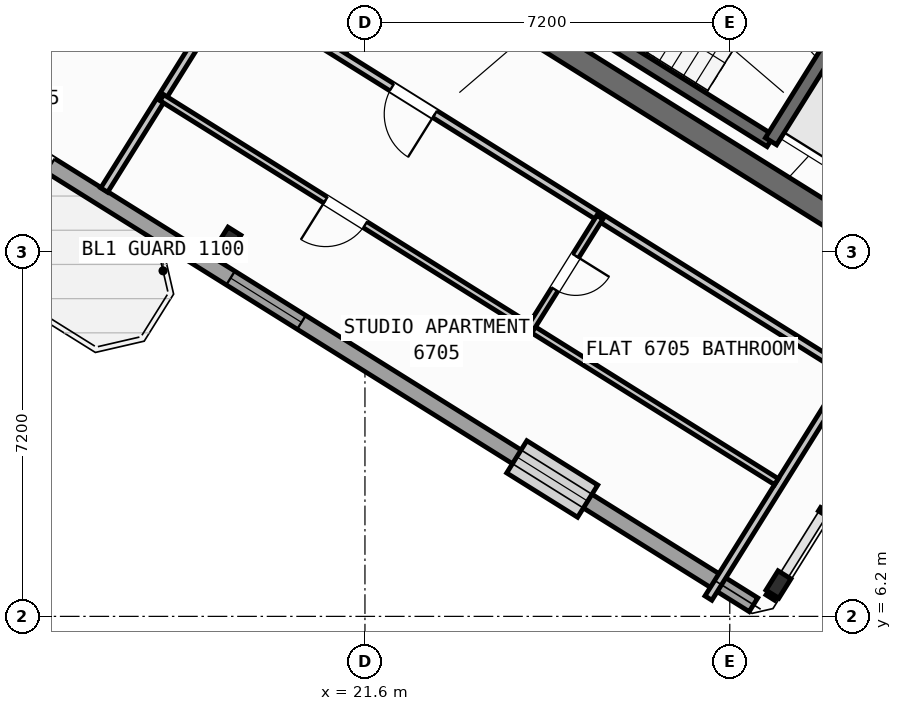
"""IFC4 building model, lengths in metres.
Left out: names, types, materials, properties, quantities, classifications, styles, units other than length and angle.
Written with IfcOpenShell. Run it as: python <this file> out.ifc"""

import sys

from ifc_helpers import new_model, si_unit, direction, frame, frame_2d, origin, origin_2d, place, context, subcontext, project, spatial, rectangle, i_section, extrude, source, transform, mapped, element, fill, save


model = new_model("IFC4")
c1 = context("Model", 3, precision=1e-05, world=origin(), true_north=direction((0.0, 1.0)))
c2 = subcontext(c1, "Body", "Model", "MODEL_VIEW")
j1 = project(units=[si_unit("LENGTHUNIT", "METRE"), si_unit("PLANEANGLEUNIT", "RADIAN")], contexts=[c1])
p1 = place(None, origin())
s1 = spatial("IfcSite", under=j1, at=p1, CompositionType="ELEMENT")
p2 = place(p1, origin())
s2 = spatial("IfcBuilding", under=s1, at=p2, CompositionType="ELEMENT")
p3 = place(p2, frame((0.0, 0.0, 266.4)))
s3 = spatial("IfcBuildingStorey", under=s2, at=p3, CompositionType="ELEMENT", Elevation=266.4)
p4 = place(p3, frame((33.324, 12.503, 0.0), z_axis=(0.0, 0.0, 1.0), x_axis=(-0.848043529849, 0.529926571782, 0.0)))
e1 = element("IfcWall", 1, at=p4, inside=s3, PredefinedType="SHEAR", context=c2, shape_type="SweptSolid", body=[
    extrude(rectangle(XDim=13.04, YDim=0.45, at=frame_2d((6.52, 0.0))), origin(), (0.0, 0.0, 1.0), 3.35),
])
m1 = source(origin(), c2, "Body", "SweptSolid", [
    extrude(i_section(OverallWidth=0.3, OverallDepth=0.45, WebThickness=0.014, FlangeThickness=0.026, at=origin_2d()), origin(), (0.0, 0.0, 1.0), 3.6),
])
for number, where, z_axis, x_axis in (
    (2, (29.761, 6.829, 0.0), (0.0, 0.0, 1.0), (-0.848, 0.53, 0.0)),
    (3, (18.906, 13.612, 0.0), (0.0, 0.0, 1.0), (-0.848, 0.53, 0.0)),
):
    element("IfcColumn", number, at=place(p3, frame(where, z_axis=z_axis, x_axis=x_axis)), inside=s3, PredefinedType="COLUMN", context=c2, shape_type="MappedRepresentation", body=[
        mapped(m1, transform((0.0, 0.0, 0.0), scale=1.0)),
    ])
p5 = place(p3, frame((29.268, 6.429, 0.0), z_axis=(0.0, 0.0, 1.0), x_axis=(-0.848049971435, 0.529916263149, 0.0)))
e4 = element("IfcWall", 4, at=p5, inside=s3, PredefinedType="STANDARD", context=c2, shape_type="SweptSolid", body=[
    extrude(rectangle(XDim=31.588, YDim=0.32, at=frame_2d((15.794, 0.0))), origin(), (0.0, 0.0, 1.0), 3.35),
])
p6 = place(p5, frame((16.362, 0.0, 0.0)))
e5 = element("IfcOpeningElement", 5, at=p6, cuts=e4, PredefinedType="OPENING", context=c2, shape_type="SweptSolid", body=[
    extrude(rectangle(XDim=1.2, YDim=2.15, at=frame_2d((0.6, 1.075))), frame((0.0, 0.17, 0.0), z_axis=(0.0, -1.0, 0.0), x_axis=(1.0, 0.0, 0.0)), (0.0, 0.0, 1.0), 0.34),
])
p7 = place(p5, frame((3.859, 0.0, 0.9)))
e6 = element("IfcOpeningElement", 6, at=p7, cuts=e4, PredefinedType="OPENING", context=c2, shape_type="SweptSolid", body=[
    extrude(rectangle(XDim=1.65, YDim=1.45, at=frame_2d((0.825, 0.725))), frame((0.0, 0.17, 0.0), z_axis=(0.0, -1.0, 0.0), x_axis=(1.0, 0.0, 0.0)), (0.0, 0.0, 1.0), 0.34),
])
p8 = place(p5, frame((10.519, 0.0, 0.9)))
e7 = element("IfcOpeningElement", 7, at=p8, cuts=e4, PredefinedType="OPENING", context=c2, shape_type="SweptSolid", body=[
    extrude(rectangle(XDim=1.65, YDim=1.45, at=frame_2d((0.825, 0.725))), frame((0.0, 0.17, 0.0), z_axis=(0.0, -1.0, 0.0), x_axis=(1.0, 0.0, 0.0)), (0.0, 0.0, 1.0), 0.34),
])
p9 = place(p5, frame((21.219, 0.0, 0.95)))
e8 = element("IfcOpeningElement", 8, at=p9, cuts=e4, PredefinedType="OPENING", context=c2, shape_type="SweptSolid", body=[
    extrude(rectangle(XDim=1.95, YDim=1.35, at=frame_2d((0.975, 0.675))), frame((0.0, 0.17, 0.0), z_axis=(0.0, -1.0, 0.0), x_axis=(1.0, 0.0, 0.0)), (0.0, 0.0, 1.0), 0.34),
])
p10 = place(p5, frame((26.406, 0.0, 1.0)))
e9 = element("IfcOpeningElement", 9, at=p10, cuts=e4, PredefinedType="OPENING", context=c2, shape_type="SweptSolid", body=[
    extrude(rectangle(XDim=0.9, YDim=1.25, at=frame_2d((0.45, 0.625))), frame((0.0, 0.17, 0.0), z_axis=(0.0, -1.0, 0.0), x_axis=(1.0, 0.0, 0.0)), (0.0, 0.0, 1.0), 0.34),
])
p11 = place(p5, frame((29.143, 0.0, 0.9)))
e10 = element("IfcOpeningElement", 10, at=p11, cuts=e4, PredefinedType="OPENING", context=c2, shape_type="SweptSolid", body=[
    extrude(rectangle(XDim=1.65, YDim=1.45, at=frame_2d((0.825, 0.725))), frame((0.0, 0.17, 0.0), z_axis=(0.0, -1.0, 0.0), x_axis=(1.0, 0.0, 0.0)), (0.0, 0.0, 1.0), 0.34),
])
p12 = place(p3, frame((29.605, 15.581, 0.0), z_axis=(0.0, 0.0, 1.0), x_axis=(-0.848036911448, 0.529937163087, 0.0)))
e11 = element("IfcWall", 11, at=p12, inside=s3, PredefinedType="SHEAR", context=c2, shape_type="SweptSolid", body=[
    extrude(rectangle(XDim=7.46, YDim=0.26, at=frame_2d((3.73, 0.0))), origin(), (0.0, 0.0, 1.0), 3.35),
])
p13 = place(p3, frame((31.288, 18.256, 0.0), z_axis=(0.0, 0.0, 1.0), x_axis=(-0.529943379326, -0.848033026897, 0.0)))
e12 = element("IfcWall", 12, at=p13, inside=s3, PredefinedType="SHEAR", context=c2, shape_type="SweptSolid", body=[
    extrude(rectangle(XDim=3.16, YDim=0.26, at=frame_2d((1.58, 0.0))), origin(), (0.0, 0.0, 1.0), 3.35),
])
p14 = place(p3, frame((21.206, 17.292, 0.0), z_axis=(0.0, 0.0, 1.0), x_axis=(-0.848050851465, 0.529914854792, 0.0)))
e13 = element("IfcWall", 13, at=p14, inside=s3, PredefinedType="PARTITIONING", context=c2, shape_type="SweptSolid", body=[
    extrude(rectangle(XDim=2.61, YDim=0.16, at=frame_2d((1.305, 0.0))), origin(), (0.0, 0.0, 1.0), 3.34),
])
p15 = place(p3, frame((21.329, 22.416, 0.0), z_axis=(0.0, 0.0, 1.0), x_axis=(-0.529920220799, -0.848047498427, 0.0)))
e14 = element("IfcWall", 14, at=p15, inside=s3, PredefinedType="PARTITIONING", context=c2, shape_type="SweptSolid", body=[
    extrude(rectangle(XDim=9.2, YDim=0.16, at=frame_2d((4.6, 0.0))), origin(), (0.0, 0.0, 1.0), 3.34),
])
p16 = place(p3, frame((16.572, 21.954, 0.0), z_axis=(0.0, 0.0, 1.0), x_axis=(-0.529904903214, -0.848057069748, 0.0)))
e15 = element("IfcWall", 15, at=p16, inside=s3, PredefinedType="PARTITIONING", context=c2, shape_type="SweptSolid", body=[
    extrude(rectangle(XDim=5.601, YDim=0.16, at=frame_2d((2.801, 0.0))), origin(), (0.0, 0.0, 1.0), 2.875),
])
p17 = place(p3, frame((32.164, 10.374, 0.0), z_axis=(0.0, 0.0, 1.0), x_axis=(-0.848044107957, 0.529925646633, 0.0)))
e16 = element("IfcWall", 16, at=p17, inside=s3, PredefinedType="PARTITIONING", context=c2, shape_type="SweptSolid", body=[
    extrude(rectangle(XDim=15.57, YDim=0.16, at=frame_2d((7.785, 0.0))), origin(), (0.0, 0.0, 1.0), 3.34),
])
p18 = place(p17, frame((10.83, 0.0, 0.0)))
e17 = element("IfcOpeningElement", 17, at=p18, cuts=e16, PredefinedType="OPENING", context=c2, shape_type="SweptSolid", body=[
    extrude(rectangle(XDim=1.0, YDim=2.1, at=frame_2d((0.5, 1.05))), frame((0.0, 0.09, 0.0), z_axis=(0.0, -1.0, 0.0), x_axis=(1.0, 0.0, 0.0)), (0.0, 0.0, 1.0), 0.18),
])
p19 = place(p3, frame((31.282, 11.208, 0.0), z_axis=(0.0, 0.0, 1.0), x_axis=(-0.529938869374, -0.84803584519, 0.0)))
e18 = element("IfcWall", 18, at=p19, inside=s3, PredefinedType="PARTITIONING", context=c2, shape_type="SweptSolid", body=[
    extrude(rectangle(XDim=5.48, YDim=0.16, at=frame_2d((2.74, 0.0))), origin(), (0.0, 0.0, 1.0), 3.34),
])
p20 = place(p3, frame((29.72, 8.859, 0.0), z_axis=(0.0, 0.0, 1.0), x_axis=(-0.848049134363, 0.529917602752, 0.0)))
e19 = element("IfcWall", 19, at=p20, inside=s3, PredefinedType="PLUMBINGWALL", context=c2, shape_type="SweptSolid", body=[
    extrude(rectangle(XDim=14.3, YDim=0.14, at=frame_2d((7.15, 0.0))), origin(), (0.0, 0.0, 1.0), 3.34),
])
p21 = place(p20, frame((9.57, 0.0, 0.0)))
e20 = element("IfcOpeningElement", 20, at=p21, cuts=e19, PredefinedType="OPENING", context=c2, shape_type="SweptSolid", body=[
    extrude(rectangle(XDim=0.92, YDim=2.08, at=frame_2d((0.46, 1.04))), frame((0.0, 0.08, 0.0), z_axis=(0.0, -1.0, 0.0), x_axis=(1.0, 0.0, 0.0)), (0.0, 0.0, 1.0), 0.16),
])
p22 = place(p3, frame((26.237, 14.078, 0.0), z_axis=(0.0, 0.0, 1.0), x_axis=(-0.52995640672, -0.848024885824, 0.0)))
e21 = element("IfcWall", 21, at=p22, inside=s3, PredefinedType="PLUMBINGWALL", context=c2, shape_type="SweptSolid", body=[
    extrude(rectangle(XDim=2.58, YDim=0.14, at=frame_2d((1.29, 0.0))), origin(), (0.0, 0.0, 1.0), 3.34),
])
p23 = place(p22, frame((0.9, 0.0, 0.0)))
e22 = element("IfcOpeningElement", 22, at=p23, cuts=e21, PredefinedType="OPENING", context=c2, shape_type="SweptSolid", body=[
    extrude(rectangle(XDim=0.78, YDim=2.05, at=frame_2d((0.39, 1.025))), frame((0.0, 0.08, 0.0), z_axis=(0.0, -1.0, 0.0), x_axis=(1.0, 0.0, 0.0)), (0.0, 0.0, 1.0), 0.16),
])
m2 = source(origin(), c2, "Body", "SweptSolid", [
    extrude(rectangle(XDim=1.65, YDim=1.45, at=frame_2d((0.825, 0.725))), frame((0.0, 0.03, 0.0), z_axis=(0.0, -1.0, 0.0), x_axis=(1.0, 0.0, 0.0)), (0.0, 0.0, 1.0), 0.06),
])
p24 = place(p7, origin())
e23 = element("IfcWindow", 23, at=p24, inside=s3, PartitioningType="SINGLE_PANEL", PredefinedType="WINDOW", context=c2, shape_type="MappedRepresentation", body=[
    mapped(m2, transform((0.0, 0.0, 0.0), scale=1.0)),
])
fill(e6, e23)
p25 = place(p8, origin())
e24 = element("IfcWindow", 24, at=p25, inside=s3, PartitioningType="SINGLE_PANEL", PredefinedType="WINDOW", context=c2, shape_type="MappedRepresentation", body=[
    mapped(m2, transform((0.0, 0.0, 0.0), scale=1.0)),
])
fill(e7, e24)
m3 = source(origin(), c2, "Body", "SweptSolid", [
    extrude(rectangle(XDim=1.0, YDim=2.1, at=frame_2d((0.5, 1.05))), frame((0.0, 0.025, 0.0), z_axis=(0.0, -1.0, 0.0), x_axis=(1.0, 0.0, 0.0)), (0.0, 0.0, 1.0), 0.05),
])
p26 = place(p18, origin())
e25 = element("IfcDoor", 25, at=p26, inside=s3, OperationType="SINGLE_SWING_LEFT", PredefinedType="DOOR", context=c2, shape_type="MappedRepresentation", body=[
    mapped(m3, transform((0.0, 0.0, 0.0), scale=1.0)),
])
fill(e17, e25)
m4 = source(origin(), c2, "Body", "SweptSolid", [
    extrude(rectangle(XDim=0.92, YDim=2.08, at=frame_2d((0.46, 1.04))), frame((0.0, 0.025, 0.0), z_axis=(0.0, -1.0, 0.0), x_axis=(1.0, 0.0, 0.0)), (0.0, 0.0, 1.0), 0.05),
])
p27 = place(p21, origin())
e26 = element("IfcDoor", 26, at=p27, inside=s3, OperationType="SINGLE_SWING_RIGHT", PredefinedType="DOOR", context=c2, shape_type="MappedRepresentation", body=[
    mapped(m4, transform((0.0, 0.0, 0.0), scale=1.0)),
])
fill(e20, e26)
m5 = source(origin(), c2, "Body", "SweptSolid", [
    extrude(rectangle(XDim=0.78, YDim=2.05, at=frame_2d((0.39, 1.025))), frame((0.0, 0.025, 0.0), z_axis=(0.0, -1.0, 0.0), x_axis=(1.0, 0.0, 0.0)), (0.0, 0.0, 1.0), 0.05),
])
p28 = place(p23, origin())
e27 = element("IfcDoor", 27, at=p28, inside=s3, OperationType="SINGLE_SWING_LEFT", PredefinedType="DOOR", context=c2, shape_type="MappedRepresentation", body=[
    mapped(m5, transform((0.0, 0.0, 0.0), scale=1.0)),
])
fill(e22, e27)
save(model, sys.argv[1])
